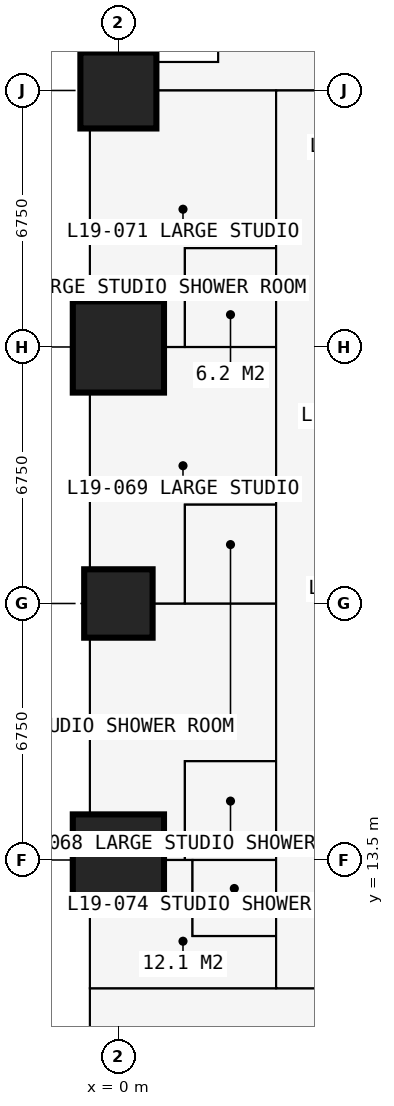
"""IFC4 building model, lengths in metres.
Left out: names, types, materials, properties, quantities, classifications, styles, units other than length and angle.
Written with IfcOpenShell. Run it as: python <this file> out.ifc"""

import sys

from ifc_helpers import new_model, si_unit, direction, frame, frame_2d, origin, origin_2d, place, context, subcontext, project, spatial, rectangle, extrude, element, fill, save


model = new_model("IFC4")
c1 = context("Model", 3, precision=1e-05, world=origin(), true_north=direction((0.0, 1.0)))
c2 = subcontext(c1, "Body", "Model", "MODEL_VIEW")
j1 = project(units=[si_unit("LENGTHUNIT", "METRE"), si_unit("PLANEANGLEUNIT", "RADIAN")], contexts=[c1])
p1 = place(None, origin())
s1 = spatial("IfcSite", under=j1, at=p1, CompositionType="ELEMENT")
p2 = place(p1, origin())
s2 = spatial("IfcBuilding", under=s1, at=p2, CompositionType="ELEMENT")
p3 = place(p2, frame((0.0, 0.0, 72.0)))
s3 = spatial("IfcBuildingStorey", under=s2, at=p3, CompositionType="ELEMENT", Elevation=72.0)
p4 = place(p3, frame((0.0, 13.5, 0.0), z_axis=(0.0, 0.0, 1.0), x_axis=(1.0, 0.0, 0.0)))
e1 = element("IfcColumn", 1, at=p4, inside=s3, PredefinedType="COLUMN", context=c2, shape_type="SweptSolid", body=[
    extrude(rectangle(XDim=2.4, YDim=2.4, at=origin_2d()), origin(), (0.0, 0.0, 1.0), 3.6),
])
p5 = place(p3, frame((0.0, 20.25, 0.0), z_axis=(0.0, 0.0, 1.0), x_axis=(1.0, 0.0, 0.0)))
e2 = element("IfcColumn", 2, at=p5, inside=s3, PredefinedType="COLUMN", context=c2, shape_type="SweptSolid", body=[
    extrude(rectangle(XDim=1.8, YDim=1.8, at=origin_2d()), origin(), (0.0, 0.0, 1.0), 3.6),
])
p6 = place(p3, frame((0.0, 27.0, 0.0), z_axis=(0.0, 0.0, 1.0), x_axis=(1.0, 0.0, 0.0)))
e3 = element("IfcColumn", 3, at=p6, inside=s3, PredefinedType="COLUMN", context=c2, shape_type="SweptSolid", body=[
    extrude(rectangle(XDim=2.4, YDim=2.4, at=origin_2d()), origin(), (0.0, 0.0, 1.0), 3.6),
])
p7 = place(p3, frame((0.0, 33.75, 0.0), z_axis=(0.0, 0.0, 1.0), x_axis=(1.0, 0.0, 0.0)))
e4 = element("IfcColumn", 4, at=p7, inside=s3, PredefinedType="COLUMN", context=c2, shape_type="SweptSolid", body=[
    extrude(rectangle(XDim=2.0, YDim=2.0, at=origin_2d()), origin(), (0.0, 0.0, 1.0), 3.6),
])
p8 = place(p3, frame((2.625, 37.875, 0.0), z_axis=(0.0, 0.0, 1.0), x_axis=(0.0, -1.0, 0.0)))
e5 = element("IfcWall", 5, at=p8, inside=s3, PredefinedType="SOLIDWALL", context=c2, shape_type="SweptSolid", body=[
    extrude(rectangle(XDim=3.375, YDim=0.3, at=frame_2d((1.688, 0.0))), origin(), (0.0, 0.0, 1.0), 3.3),
])
p9 = place(p8, frame((0.788, 0.0, 0.6)))
e6 = element("IfcOpeningElement", 6, at=p9, cuts=e5, PredefinedType="OPENING", context=c2, shape_type="SweptSolid", body=[
    extrude(rectangle(XDim=1.8, YDim=2.1, at=frame_2d((0.9, 1.05))), frame((0.0, 0.16, 0.0), z_axis=(0.0, -1.0, 0.0), x_axis=(1.0, 0.0, 0.0)), (0.0, 0.0, 1.0), 0.32),
])
p10 = place(p3, frame((2.625, 34.5, 0.0), z_axis=(0.0, 0.0, 1.0), x_axis=(-1.0, 0.0, 0.0)))
e7 = element("IfcWall", 7, at=p10, inside=s3, PredefinedType="SOLIDWALL", context=c2, shape_type="SweptSolid", body=[
    extrude(rectangle(XDim=3.375, YDim=0.3, at=frame_2d((1.688, 0.0))), origin(), (0.0, 0.0, 1.0), 3.3),
])
p11 = place(p10, frame((0.292, 0.0, 0.9)))
e8 = element("IfcOpeningElement", 8, at=p11, cuts=e7, PredefinedType="OPENING", context=c2, shape_type="SweptSolid", body=[
    extrude(rectangle(XDim=1.2, YDim=1.8, at=frame_2d((0.6, 0.9))), frame((0.0, 0.16, 0.0), z_axis=(0.0, -1.0, 0.0), x_axis=(1.0, 0.0, 0.0)), (0.0, 0.0, 1.0), 0.32),
])
p12 = place(p3, frame((-0.75, 20.25, 0.0), z_axis=(0.0, 0.0, 1.0), x_axis=(0.0, 1.0, 0.0)))
e9 = element("IfcWall", 9, at=p12, inside=s3, PredefinedType="SOLIDWALL", context=c2, shape_type="SweptSolid", body=[
    extrude(rectangle(XDim=6.75, YDim=0.15, at=frame_2d((3.375, 0.0))), origin(), (0.0, 0.0, 1.0), 3.3),
])
p13 = place(p12, frame((0.962, 0.0, 0.0)))
e10 = element("IfcOpeningElement", 10, at=p13, cuts=e9, PredefinedType="OPENING", context=c2, shape_type="SweptSolid", body=[
    extrude(rectangle(XDim=1.0, YDim=2.2, at=frame_2d((0.5, 1.1))), frame((0.0, 0.085, 0.0), z_axis=(0.0, -1.0, 0.0), x_axis=(1.0, 0.0, 0.0)), (0.0, 0.0, 1.0), 0.17),
])
p14 = place(p12, frame((2.025, 0.0, 0.9)))
e11 = element("IfcOpeningElement", 11, at=p14, cuts=e9, PredefinedType="OPENING", context=c2, shape_type="SweptSolid", body=[
    extrude(rectangle(XDim=1.2, YDim=1.8, at=frame_2d((0.6, 0.9))), frame((0.0, 0.085, 0.0), z_axis=(0.0, -1.0, 0.0), x_axis=(1.0, 0.0, 0.0)), (0.0, 0.0, 1.0), 0.17),
])
p15 = place(p12, frame((4.488, 0.0, 0.0)))
e12 = element("IfcOpeningElement", 12, at=p15, cuts=e9, PredefinedType="OPENING", context=c2, shape_type="SweptSolid", body=[
    extrude(rectangle(XDim=1.0, YDim=2.2, at=frame_2d((0.5, 1.1))), frame((0.0, 0.085, 0.0), z_axis=(0.0, -1.0, 0.0), x_axis=(1.0, 0.0, 0.0)), (0.0, 0.0, 1.0), 0.17),
])
p16 = place(p12, frame((3.525, 0.0, 0.9)))
e13 = element("IfcOpeningElement", 13, at=p16, cuts=e9, PredefinedType="OPENING", context=c2, shape_type="SweptSolid", body=[
    extrude(rectangle(XDim=0.9, YDim=1.8, at=frame_2d((0.45, 0.9))), frame((0.0, 0.085, 0.0), z_axis=(0.0, -1.0, 0.0), x_axis=(1.0, 0.0, 0.0)), (0.0, 0.0, 1.0), 0.17),
])
p17 = place(p3, frame((-0.85, 23.625, 0.0), z_axis=(0.0, 0.0, 1.0), x_axis=(-1.0, 0.0, 0.0)))
e14 = element("IfcWall", 14, at=p17, inside=s3, PredefinedType="USERDEFINED", context=c2, shape_type="SweptSolid", body=[
    extrude(rectangle(XDim=2.2, YDim=1.0, at=frame_2d((1.1, 0.0))), origin(), (0.0, 0.0, 1.0), 0.9),
])
p18 = place(p3, frame((-0.734, 10.125, 0.0), z_axis=(0.0, 0.0, 1.0), x_axis=(1.0, 0.0, 0.0)))
e15 = element("IfcWall", 15, at=p18, inside=s3, PredefinedType="PARTITIONING", context=c2, shape_type="SweptSolid", body=[
    extrude(rectangle(XDim=10.859, YDim=0.15, at=frame_2d((5.429, 0.0))), origin(), (0.0, 0.0, 1.0), 3.3),
])
p19 = place(p18, frame((5.134, 0.0, 0.0)))
e16 = element("IfcOpeningElement", 16, at=p19, cuts=e15, PredefinedType="OPENING", context=c2, shape_type="SweptSolid", body=[
    extrude(rectangle(XDim=1.0, YDim=2.2, at=frame_2d((0.5, 1.1))), frame((0.0, 0.085, 0.0), z_axis=(0.0, -1.0, 0.0), x_axis=(1.0, 0.0, 0.0)), (0.0, 0.0, 1.0), 0.17),
])
p20 = place(p3, frame((-0.734, 13.5, 0.0), z_axis=(0.0, 0.0, 1.0), x_axis=(1.0, 0.0, 0.0)))
e17 = element("IfcWall", 17, at=p20, inside=s3, PredefinedType="PARTITIONING", context=c2, shape_type="SweptSolid", body=[
    extrude(rectangle(XDim=4.884, YDim=0.175, at=frame_2d((2.442, 0.0))), origin(), (0.0, 0.0, 1.0), 2.802),
])
p21 = place(p3, frame((-0.734, 20.25, 0.0), z_axis=(0.0, 0.0, 1.0), x_axis=(1.0, 0.0, 0.0)))
e18 = element("IfcWall", 18, at=p21, inside=s3, PredefinedType="PARTITIONING", context=c2, shape_type="SweptSolid", body=[
    extrude(rectangle(XDim=4.884, YDim=0.175, at=frame_2d((2.442, 0.0))), origin(), (0.0, 0.0, 1.0), 2.802),
])
p22 = place(p21, frame((3.234, 0.0, 0.0)))
e19 = element("IfcOpeningElement", 19, at=p22, cuts=e18, PredefinedType="OPENING", context=c2, shape_type="SweptSolid", body=[
    extrude(rectangle(XDim=0.9, YDim=2.2, at=frame_2d((0.45, 1.1))), frame((0.0, 0.097, 0.0), z_axis=(0.0, -1.0, 0.0), x_axis=(1.0, 0.0, 0.0)), (0.0, 0.0, 1.0), 0.195),
])
p23 = place(p3, frame((-0.734, 27.0, 0.0), z_axis=(0.0, 0.0, 1.0), x_axis=(1.0, 0.0, 0.0)))
e20 = element("IfcWall", 20, at=p23, inside=s3, PredefinedType="PARTITIONING", context=c2, shape_type="SweptSolid", body=[
    extrude(rectangle(XDim=4.884, YDim=0.175, at=frame_2d((2.442, 0.0))), origin(), (0.0, 0.0, 1.0), 2.802),
])
p24 = place(p23, frame((3.234, 0.0, 0.0)))
e21 = element("IfcOpeningElement", 21, at=p24, cuts=e20, PredefinedType="OPENING", context=c2, shape_type="SweptSolid", body=[
    extrude(rectangle(XDim=0.9, YDim=2.2, at=frame_2d((0.45, 1.1))), frame((0.0, 0.097, 0.0), z_axis=(0.0, -1.0, 0.0), x_axis=(1.0, 0.0, 0.0)), (0.0, 0.0, 1.0), 0.195),
])
p25 = place(p3, frame((-0.734, 33.75, 0.0), z_axis=(0.0, 0.0, 1.0), x_axis=(1.0, 0.0, 0.0)))
e22 = element("IfcWall", 22, at=p25, inside=s3, PredefinedType="PARTITIONING", context=c2, shape_type="SweptSolid", body=[
    extrude(rectangle(XDim=10.859, YDim=0.15, at=frame_2d((5.429, 0.0))), origin(), (0.0, 0.0, 1.0), 2.802),
])
p26 = place(p3, frame((1.75, 13.5, 0.0), z_axis=(0.0, 0.0, 1.0), x_axis=(0.0, 1.0, 0.0)))
e23 = element("IfcWall", 23, at=p26, inside=s3, PredefinedType="PARTITIONING", context=c2, shape_type="SweptSolid", body=[
    extrude(rectangle(XDim=2.6, YDim=0.1, at=frame_2d((1.3, 0.0))), origin(), (0.0, 0.0, 1.0), 3.3),
])
p27 = place(p26, frame((1.25, 0.0, 0.0)))
e24 = element("IfcOpeningElement", 24, at=p27, cuts=e23, PredefinedType="OPENING", context=c2, shape_type="SweptSolid", body=[
    extrude(rectangle(XDim=0.9, YDim=2.2, at=frame_2d((0.45, 1.1))), frame((0.0, 0.06, 0.0), z_axis=(0.0, -1.0, 0.0), x_axis=(1.0, 0.0, 0.0)), (0.0, 0.0, 1.0), 0.12),
])
p28 = place(p3, frame((1.75, 16.1, 0.0), z_axis=(0.0, 0.0, 1.0), x_axis=(1.0, 0.0, 0.0)))
e25 = element("IfcWall", 25, at=p28, inside=s3, PredefinedType="PARTITIONING", context=c2, shape_type="SweptSolid", body=[
    extrude(rectangle(XDim=2.4, YDim=0.1, at=frame_2d((1.2, 0.0))), origin(), (0.0, 0.0, 1.0), 3.3),
])
p29 = place(p3, frame((1.75, 20.25, 0.0), z_axis=(0.0, 0.0, 1.0), x_axis=(0.0, 1.0, 0.0)))
e26 = element("IfcWall", 26, at=p29, inside=s3, PredefinedType="PARTITIONING", context=c2, shape_type="SweptSolid", body=[
    extrude(rectangle(XDim=2.6, YDim=0.1, at=frame_2d((1.3, 0.0))), origin(), (0.0, 0.0, 1.0), 3.3),
])
p30 = place(p3, frame((1.75, 22.85, 0.0), z_axis=(0.0, 0.0, 1.0), x_axis=(1.0, 0.0, 0.0)))
e27 = element("IfcWall", 27, at=p30, inside=s3, PredefinedType="PARTITIONING", context=c2, shape_type="SweptSolid", body=[
    extrude(rectangle(XDim=2.4, YDim=0.1, at=frame_2d((1.2, 0.0))), origin(), (0.0, 0.0, 1.0), 3.3),
])
p31 = place(p3, frame((1.75, 27.0, 0.0), z_axis=(0.0, 0.0, 1.0), x_axis=(0.0, 1.0, 0.0)))
e28 = element("IfcWall", 28, at=p31, inside=s3, PredefinedType="PARTITIONING", context=c2, shape_type="SweptSolid", body=[
    extrude(rectangle(XDim=2.6, YDim=0.1, at=frame_2d((1.3, 0.0))), origin(), (0.0, 0.0, 1.0), 3.3),
])
p32 = place(p3, frame((1.75, 29.6, 0.0), z_axis=(0.0, 0.0, 1.0), x_axis=(1.0, 0.0, 0.0)))
e29 = element("IfcWall", 29, at=p32, inside=s3, PredefinedType="PARTITIONING", context=c2, shape_type="SweptSolid", body=[
    extrude(rectangle(XDim=2.4, YDim=0.1, at=frame_2d((1.2, 0.0))), origin(), (0.0, 0.0, 1.0), 3.3),
])
p33 = place(p3, frame((1.95, 11.5, 0.0), z_axis=(0.0, 0.0, 1.0), x_axis=(0.0, 1.0, 0.0)))
e30 = element("IfcWall", 30, at=p33, inside=s3, PredefinedType="PARTITIONING", context=c2, shape_type="SweptSolid", body=[
    extrude(rectangle(XDim=2.0, YDim=0.1, at=frame_2d((1.0, 0.0))), origin(), (0.0, 0.0, 1.0), 3.3),
])
p34 = place(p3, frame((1.95, 11.5, 0.0), z_axis=(0.0, 0.0, 1.0), x_axis=(1.0, 0.0, 0.0)))
e31 = element("IfcWall", 31, at=p34, inside=s3, PredefinedType="PARTITIONING", context=c2, shape_type="SweptSolid", body=[
    extrude(rectangle(XDim=2.2, YDim=0.1, at=frame_2d((1.1, 0.0))), origin(), (0.0, 0.0, 1.0), 3.3),
])
p35 = place(p34, frame((0.65, 0.0, 0.0)))
e32 = element("IfcOpeningElement", 32, at=p35, cuts=e31, PredefinedType="OPENING", context=c2, shape_type="SweptSolid", body=[
    extrude(rectangle(XDim=0.9, YDim=2.2, at=frame_2d((0.45, 1.1))), frame((0.0, 0.06, 0.0), z_axis=(0.0, -1.0, 0.0), x_axis=(1.0, 0.0, 0.0)), (0.0, 0.0, 1.0), 0.12),
])
p36 = place(p3, frame((4.15, 10.125, 0.0), z_axis=(0.0, 0.0, 1.0), x_axis=(0.0, 1.0, 0.0)))
e33 = element("IfcWall", 33, at=p36, inside=s3, PredefinedType="PARTITIONING", context=c2, shape_type="SweptSolid", body=[
    extrude(rectangle(XDim=23.625, YDim=0.1, at=frame_2d((11.812, 0.0))), origin(), (0.0, 0.0, 1.0), 3.3),
])
p37 = place(p36, frame((7.575, 0.0, 0.0)))
e34 = element("IfcOpeningElement", 34, at=p37, cuts=e33, PredefinedType="OPENING", context=c2, shape_type="SweptSolid", body=[
    extrude(rectangle(XDim=0.95, YDim=2.2, at=frame_2d((0.475, 1.1))), frame((0.0, 0.06, 0.0), z_axis=(0.0, -1.0, 0.0), x_axis=(1.0, 0.0, 0.0)), (0.0, 0.0, 1.0), 0.12),
])
p38 = place(p36, frame((14.325, 0.0, 0.0)))
e35 = element("IfcOpeningElement", 35, at=p38, cuts=e33, PredefinedType="OPENING", context=c2, shape_type="SweptSolid", body=[
    extrude(rectangle(XDim=0.95, YDim=2.2, at=frame_2d((0.475, 1.1))), frame((0.0, 0.06, 0.0), z_axis=(0.0, -1.0, 0.0), x_axis=(1.0, 0.0, 0.0)), (0.0, 0.0, 1.0), 0.12),
])
p39 = place(p36, frame((21.075, 0.0, 0.0)))
e36 = element("IfcOpeningElement", 36, at=p39, cuts=e33, PredefinedType="OPENING", context=c2, shape_type="SweptSolid", body=[
    extrude(rectangle(XDim=0.95, YDim=2.2, at=frame_2d((0.475, 1.1))), frame((0.0, 0.06, 0.0), z_axis=(0.0, -1.0, 0.0), x_axis=(1.0, 0.0, 0.0)), (0.0, 0.0, 1.0), 0.12),
])
p40 = place(p36, frame((0.2, 0.0, 0.0)))
e37 = element("IfcOpeningElement", 37, at=p40, cuts=e33, PredefinedType="OPENING", context=c2, shape_type="SweptSolid", body=[
    extrude(rectangle(XDim=0.95, YDim=2.2, at=frame_2d((0.475, 1.1))), frame((0.0, 0.06, 0.0), z_axis=(0.0, -1.0, 0.0), x_axis=(1.0, 0.0, 0.0)), (0.0, 0.0, 1.0), 0.12),
])
p41 = place(p11, origin())
e38 = element("IfcWindow", 38, at=p41, inside=s3, PartitioningType="SINGLE_PANEL", PredefinedType="WINDOW", context=c2, shape_type="SweptSolid", body=[
    extrude(rectangle(XDim=1.2, YDim=1.8, at=frame_2d((0.6, 0.9))), frame((0.0, 0.03, 0.0), z_axis=(0.0, -1.0, 0.0), x_axis=(1.0, 0.0, 0.0)), (0.0, 0.0, 1.0), 0.06),
])
fill(e8, e38)
p42 = place(p13, origin())
e39 = element("IfcDoor", 39, at=p42, inside=s3, OperationType="SINGLE_SWING_LEFT", PredefinedType="DOOR", context=c2, shape_type="SweptSolid", body=[
    extrude(rectangle(XDim=1.0, YDim=2.2, at=frame_2d((0.5, 1.1))), frame((0.0, 0.025, 0.0), z_axis=(0.0, -1.0, 0.0), x_axis=(1.0, 0.0, 0.0)), (0.0, 0.0, 1.0), 0.05),
])
fill(e10, e39)
p43 = place(p14, origin())
e40 = element("IfcWindow", 40, at=p43, inside=s3, PartitioningType="SINGLE_PANEL", PredefinedType="WINDOW", context=c2, shape_type="SweptSolid", body=[
    extrude(rectangle(XDim=1.2, YDim=1.8, at=frame_2d((0.6, 0.9))), frame((0.0, 0.03, 0.0), z_axis=(0.0, -1.0, 0.0), x_axis=(1.0, 0.0, 0.0)), (0.0, 0.0, 1.0), 0.06),
])
fill(e11, e40)
p44 = place(p15, origin())
e41 = element("IfcDoor", 41, at=p44, inside=s3, OperationType="SINGLE_SWING_RIGHT", PredefinedType="DOOR", context=c2, shape_type="SweptSolid", body=[
    extrude(rectangle(XDim=1.0, YDim=2.2, at=frame_2d((0.5, 1.1))), frame((0.0, 0.025, 0.0), z_axis=(0.0, -1.0, 0.0), x_axis=(1.0, 0.0, 0.0)), (0.0, 0.0, 1.0), 0.05),
])
fill(e12, e41)
p45 = place(p16, origin())
e42 = element("IfcWindow", 42, at=p45, inside=s3, PartitioningType="SINGLE_PANEL", PredefinedType="WINDOW", context=c2, shape_type="SweptSolid", body=[
    extrude(rectangle(XDim=0.9, YDim=1.8, at=frame_2d((0.45, 0.9))), frame((0.0, 0.03, 0.0), z_axis=(0.0, -1.0, 0.0), x_axis=(1.0, 0.0, 0.0)), (0.0, 0.0, 1.0), 0.06),
])
fill(e13, e42)
p46 = place(p19, origin())
e43 = element("IfcDoor", 43, at=p46, inside=s3, OperationType="SINGLE_SWING_LEFT", PredefinedType="DOOR", context=c2, shape_type="SweptSolid", body=[
    extrude(rectangle(XDim=1.0, YDim=2.2, at=frame_2d((0.5, 1.1))), frame((0.0, 0.025, 0.0), z_axis=(0.0, -1.0, 0.0), x_axis=(1.0, 0.0, 0.0)), (0.0, 0.0, 1.0), 0.05),
])
fill(e16, e43)
p47 = place(p37, origin())
e44 = element("IfcDoor", 44, at=p47, inside=s3, OperationType="SINGLE_SWING_LEFT", PredefinedType="DOOR", context=c2, shape_type="SweptSolid", body=[
    extrude(rectangle(XDim=0.95, YDim=2.2, at=frame_2d((0.475, 1.1))), frame((0.0, 0.025, 0.0), z_axis=(0.0, -1.0, 0.0), x_axis=(1.0, 0.0, 0.0)), (0.0, 0.0, 1.0), 0.05),
])
fill(e34, e44)
p48 = place(p27, origin())
e45 = element("IfcDoor", 45, at=p48, inside=s3, OperationType="SINGLE_SWING_RIGHT", PredefinedType="DOOR", context=c2, shape_type="SweptSolid", body=[
    extrude(rectangle(XDim=0.9, YDim=2.2, at=frame_2d((0.45, 1.1))), frame((0.0, 0.025, 0.0), z_axis=(0.0, -1.0, 0.0), x_axis=(1.0, 0.0, 0.0)), (0.0, 0.0, 1.0), 0.05),
])
fill(e24, e45)
p49 = place(p38, origin())
e46 = element("IfcDoor", 46, at=p49, inside=s3, OperationType="SINGLE_SWING_LEFT", PredefinedType="DOOR", context=c2, shape_type="SweptSolid", body=[
    extrude(rectangle(XDim=0.95, YDim=2.2, at=frame_2d((0.475, 1.1))), frame((0.0, 0.025, 0.0), z_axis=(0.0, -1.0, 0.0), x_axis=(1.0, 0.0, 0.0)), (0.0, 0.0, 1.0), 0.05),
])
fill(e35, e46)
p50 = place(p22, origin())
e47 = element("IfcDoor", 47, at=p50, inside=s3, OperationType="SINGLE_SWING_RIGHT", PredefinedType="DOOR", context=c2, shape_type="SweptSolid", body=[
    extrude(rectangle(XDim=0.9, YDim=2.2, at=frame_2d((0.45, 1.1))), frame((0.0, 0.025, 0.0), z_axis=(0.0, -1.0, 0.0), x_axis=(1.0, 0.0, 0.0)), (0.0, 0.0, 1.0), 0.05),
])
fill(e19, e47)
p51 = place(p39, origin())
e48 = element("IfcDoor", 48, at=p51, inside=s3, OperationType="SINGLE_SWING_LEFT", PredefinedType="DOOR", context=c2, shape_type="SweptSolid", body=[
    extrude(rectangle(XDim=0.95, YDim=2.2, at=frame_2d((0.475, 1.1))), frame((0.0, 0.025, 0.0), z_axis=(0.0, -1.0, 0.0), x_axis=(1.0, 0.0, 0.0)), (0.0, 0.0, 1.0), 0.05),
])
fill(e36, e48)
p52 = place(p24, origin())
e49 = element("IfcDoor", 49, at=p52, inside=s3, OperationType="SINGLE_SWING_RIGHT", PredefinedType="DOOR", context=c2, shape_type="SweptSolid", body=[
    extrude(rectangle(XDim=0.9, YDim=2.2, at=frame_2d((0.45, 1.1))), frame((0.0, 0.025, 0.0), z_axis=(0.0, -1.0, 0.0), x_axis=(1.0, 0.0, 0.0)), (0.0, 0.0, 1.0), 0.05),
])
fill(e21, e49)
p53 = place(p40, origin())
e50 = element("IfcDoor", 50, at=p53, inside=s3, OperationType="SINGLE_SWING_LEFT", PredefinedType="DOOR", context=c2, shape_type="SweptSolid", body=[
    extrude(rectangle(XDim=0.95, YDim=2.2, at=frame_2d((0.475, 1.1))), frame((0.0, 0.025, 0.0), z_axis=(0.0, -1.0, 0.0), x_axis=(1.0, 0.0, 0.0)), (0.0, 0.0, 1.0), 0.05),
])
fill(e37, e50)
p54 = place(p35, origin())
e51 = element("IfcDoor", 51, at=p54, inside=s3, OperationType="SINGLE_SWING_RIGHT", PredefinedType="DOOR", context=c2, shape_type="SweptSolid", body=[
    extrude(rectangle(XDim=0.9, YDim=2.2, at=frame_2d((0.45, 1.1))), frame((0.0, 0.025, 0.0), z_axis=(0.0, -1.0, 0.0), x_axis=(1.0, 0.0, 0.0)), (0.0, 0.0, 1.0), 0.05),
])
fill(e32, e51)
save(model, sys.argv[1])
